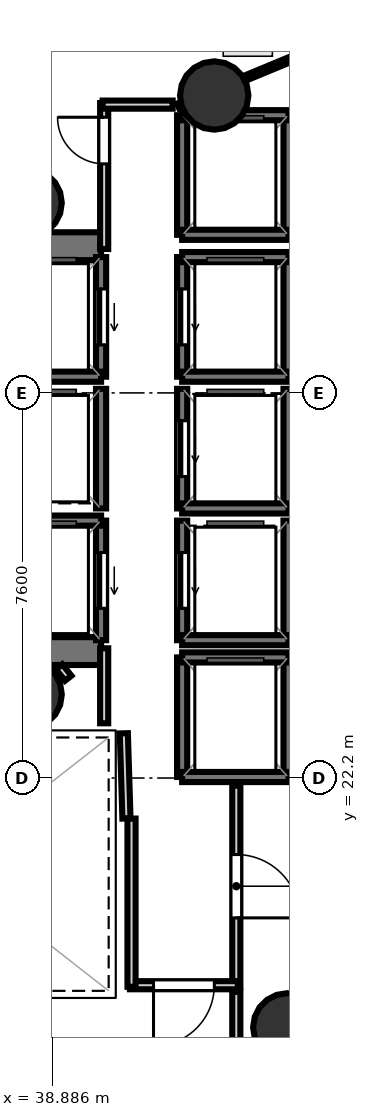
"""IFC4 building model, lengths in metres.
Left out: names, types, materials, properties, quantities, classifications, styles, units other than length and angle.
Written with IfcOpenShell. Run it as: python <this file> out.ifc"""

import sys

from ifc_helpers import new_model, si_unit, direction, frame, frame_2d, origin, origin_2d, place, context, subcontext, project, spatial, rectangle, hollow_circle, extrude, element, fill, save


model = new_model("IFC4")
c1 = context("Model", 3, precision=1e-05, world=origin(), true_north=direction((0.0, 1.0)))
c2 = subcontext(c1, "Body", "Model", "MODEL_VIEW")
j1 = project(units=[si_unit("LENGTHUNIT", "METRE"), si_unit("PLANEANGLEUNIT", "RADIAN")], contexts=[c1])
p1 = place(None, origin())
s1 = spatial("IfcSite", under=j1, at=p1, CompositionType="ELEMENT")
p2 = place(p1, origin())
s2 = spatial("IfcBuilding", under=s1, at=p2, CompositionType="ELEMENT")
p3 = place(p2, frame((0.0, 0.0, 166.1)))
s3 = spatial("IfcBuildingStorey", under=s2, at=p3, CompositionType="ELEMENT", Elevation=166.1)
p4 = place(p3, frame((29.23, 32.695, 0.0), z_axis=(0.0, 0.0, 1.0), x_axis=(1.0, 0.0, 0.0)))
e1 = element("IfcWall", 1, at=p4, inside=s3, PredefinedType="SHEAR", context=c2, shape_type="SweptSolid", body=[
    extrude(rectangle(XDim=10.62, YDim=0.55, at=frame_2d((5.31, 0.0))), origin(), (0.0, 0.0, 1.0), 3.52),
])
p5 = place(p4, frame((0.995, 0.0, 0.0)))
e2 = element("IfcOpeningElement", 2, at=p5, cuts=e1, PredefinedType="OPENING", context=c2, shape_type="SweptSolid", body=[
    extrude(rectangle(XDim=1.25, YDim=2.15, at=frame_2d((0.625, 1.075))), frame((0.0, 0.285, 0.0), z_axis=(0.0, -1.0, 0.0), x_axis=(1.0, 0.0, 0.0)), (0.0, 0.0, 1.0), 0.57),
])
p6 = place(p3, frame((29.23, 24.705, 0.0), z_axis=(0.0, 0.0, 1.0), x_axis=(1.0, 0.0, 0.0)))
e3 = element("IfcWall", 3, at=p6, inside=s3, PredefinedType="SHEAR", context=c2, shape_type="SweptSolid", body=[
    extrude(rectangle(XDim=10.62, YDim=0.55, at=frame_2d((5.31, 0.0))), origin(), (0.0, 0.0, 1.0), 3.52),
])
p7 = place(p6, frame((0.795, 0.0, 0.0)))
e4 = element("IfcOpeningElement", 4, at=p7, cuts=e3, PredefinedType="OPENING", context=c2, shape_type="SweptSolid", body=[
    extrude(rectangle(XDim=1.25, YDim=2.15, at=frame_2d((0.625, 1.075))), frame((0.0, 0.285, 0.0), z_axis=(0.0, -1.0, 0.0), x_axis=(1.0, 0.0, 0.0)), (0.0, 0.0, 1.0), 0.57),
])
for number, where, z_axis, x_axis in (
    (5, (38.4, 33.55, 0.0), (0.0, 0.0, 1.0), (1.0, 0.0, 0.0)),
    (6, (38.4, 23.85, 0.0), (0.0, 0.0, 1.0), (1.0, 0.0, 0.0)),
    (7, (42.083, 35.669, 0.0), (0.0, 0.0, 1.0), (1.0, 0.0, 0.0)),
    (8, (43.525, 17.279, 0.0), (0.0, 0.0, 1.0), (1.0, 0.0, 0.0)),
):
    element("IfcColumn", number, at=place(p3, frame(where, z_axis=z_axis, x_axis=x_axis)), inside=s3, PredefinedType="COLUMN", context=c2, shape_type="SweptSolid", body=[
        extrude(hollow_circle(Radius=0.675, WallThickness=0.032, at=origin_2d()), origin(), (0.0, 0.0, 1.0), 3.7),
    ])
p8 = place(p3, frame((39.85, 30.12, 0.0), z_axis=(0.0, 0.0, 1.0), x_axis=(0.0, 1.0, 0.0)))
e9 = element("IfcWall", 9, at=p8, inside=s3, PredefinedType="SOLIDWALL", context=c2, shape_type="SweptSolid", body=[
    extrude(rectangle(XDim=2.36, YDim=0.2, at=frame_2d((1.18, 0.0))), origin(), (0.0, 0.0, 1.0), 3.52),
])
p9 = place(p8, frame((0.63, 0.0, 0.0)))
e10 = element("IfcOpeningElement", 10, at=p9, cuts=e9, PredefinedType="OPENING", context=c2, shape_type="SweptSolid", body=[
    extrude(rectangle(XDim=1.1, YDim=2.15, at=frame_2d((0.55, 1.075))), frame((0.0, 0.11, 0.0), z_axis=(0.0, -1.0, 0.0), x_axis=(1.0, 0.0, 0.0)), (0.0, 0.0, 1.0), 0.22),
])
p10 = place(p3, frame((37.75, 30.12, 0.0), z_axis=(0.0, 0.0, 1.0), x_axis=(1.0, 0.0, 0.0)))
e11 = element("IfcWall", 11, at=p10, inside=s3, PredefinedType="SOLIDWALL", context=c2, shape_type="SweptSolid", body=[
    extrude(rectangle(XDim=2.1, YDim=0.2, at=frame_2d((1.05, 0.0))), origin(), (0.0, 0.0, 1.0), 3.52),
])
p11 = place(p3, frame((39.85, 24.92, 0.0), z_axis=(0.0, 0.0, 1.0), x_axis=(0.0, 1.0, 0.0)))
e12 = element("IfcWall", 12, at=p11, inside=s3, PredefinedType="SOLIDWALL", context=c2, shape_type="SweptSolid", body=[
    extrude(rectangle(XDim=2.36, YDim=0.2, at=frame_2d((1.18, 0.0))), origin(), (0.0, 0.0, 1.0), 3.52),
])
p12 = place(p11, frame((0.63, 0.0, 0.0)))
e13 = element("IfcOpeningElement", 13, at=p12, cuts=e12, PredefinedType="OPENING", context=c2, shape_type="SweptSolid", body=[
    extrude(rectangle(XDim=1.1, YDim=2.15, at=frame_2d((0.55, 1.075))), frame((0.0, 0.11, 0.0), z_axis=(0.0, -1.0, 0.0), x_axis=(1.0, 0.0, 0.0)), (0.0, 0.0, 1.0), 0.22),
])
p13 = place(p3, frame((37.75, 27.28, 0.0), z_axis=(0.0, 0.0, 1.0), x_axis=(1.0, 0.0, 0.0)))
e14 = element("IfcWall", 14, at=p13, inside=s3, PredefinedType="SOLIDWALL", context=c2, shape_type="SweptSolid", body=[
    extrude(rectangle(XDim=2.1, YDim=0.2, at=frame_2d((1.05, 0.0))), origin(), (0.0, 0.0, 1.0), 3.52),
])
p14 = place(p3, frame((43.55, 30.12, 0.0), z_axis=(0.0, 0.0, 1.0), x_axis=(0.0, 1.0, 0.0)))
e15 = element("IfcWall", 15, at=p14, inside=s3, PredefinedType="SOLIDWALL", context=c2, shape_type="SweptSolid", body=[
    extrude(rectangle(XDim=2.36, YDim=0.2, at=frame_2d((1.18, 0.0))), origin(), (0.0, 0.0, 1.0), 3.52),
])
p15 = place(p3, frame((41.45, 30.12, 0.0), z_axis=(0.0, 0.0, 1.0), x_axis=(0.0, 1.0, 0.0)))
e16 = element("IfcWall", 16, at=p15, inside=s3, PredefinedType="SOLIDWALL", context=c2, shape_type="SweptSolid", body=[
    extrude(rectangle(XDim=2.36, YDim=0.2, at=frame_2d((1.18, 0.0))), origin(), (0.0, 0.0, 1.0), 3.52),
])
p16 = place(p15, frame((0.63, 0.0, 0.0)))
e17 = element("IfcOpeningElement", 17, at=p16, cuts=e16, PredefinedType="OPENING", context=c2, shape_type="SweptSolid", body=[
    extrude(rectangle(XDim=1.1, YDim=2.15, at=frame_2d((0.55, 1.075))), frame((0.0, 0.11, 0.0), z_axis=(0.0, -1.0, 0.0), x_axis=(1.0, 0.0, 0.0)), (0.0, 0.0, 1.0), 0.22),
])
for number, where, z_axis, x_axis in (
    (18, (41.45, 32.48, 0.0), (0.0, 0.0, 1.0), (1.0, 0.0, 0.0)),
    (19, (41.45, 30.12, 0.0), (0.0, 0.0, 1.0), (1.0, 0.0, 0.0)),
):
    element("IfcWall", number, at=place(p3, frame(where, z_axis=z_axis, x_axis=x_axis)), inside=s3, PredefinedType="SOLIDWALL", context=c2, shape_type="SweptSolid", body=[
        extrude(rectangle(XDim=2.1, YDim=0.2, at=frame_2d((1.05, 0.0))), origin(), (0.0, 0.0, 1.0), 3.52),
    ])
p17 = place(p3, frame((43.55, 27.52, 0.0), z_axis=(0.0, 0.0, 1.0), x_axis=(0.0, 1.0, 0.0)))
e20 = element("IfcWall", 20, at=p17, inside=s3, PredefinedType="SOLIDWALL", context=c2, shape_type="SweptSolid", body=[
    extrude(rectangle(XDim=2.36, YDim=0.2, at=frame_2d((1.18, 0.0))), origin(), (0.0, 0.0, 1.0), 3.52),
])
p18 = place(p3, frame((41.45, 27.52, 0.0), z_axis=(0.0, 0.0, 1.0), x_axis=(0.0, 1.0, 0.0)))
e21 = element("IfcWall", 21, at=p18, inside=s3, PredefinedType="SOLIDWALL", context=c2, shape_type="SweptSolid", body=[
    extrude(rectangle(XDim=2.36, YDim=0.2, at=frame_2d((1.18, 0.0))), origin(), (0.0, 0.0, 1.0), 3.52),
])
p19 = place(p18, frame((0.63, 0.0, 0.0)))
e22 = element("IfcOpeningElement", 22, at=p19, cuts=e21, PredefinedType="OPENING", context=c2, shape_type="SweptSolid", body=[
    extrude(rectangle(XDim=1.1, YDim=2.15, at=frame_2d((0.55, 1.075))), frame((0.0, 0.11, 0.0), z_axis=(0.0, -1.0, 0.0), x_axis=(1.0, 0.0, 0.0)), (0.0, 0.0, 1.0), 0.22),
])
p20 = place(p3, frame((41.45, 27.52, 0.0), z_axis=(0.0, 0.0, 1.0), x_axis=(1.0, 0.0, 0.0)))
e23 = element("IfcWall", 23, at=p20, inside=s3, PredefinedType="SOLIDWALL", context=c2, shape_type="SweptSolid", body=[
    extrude(rectangle(XDim=2.1, YDim=0.2, at=frame_2d((1.05, 0.0))), origin(), (0.0, 0.0, 1.0), 3.52),
])
p21 = place(p3, frame((43.55, 24.92, 0.0), z_axis=(0.0, 0.0, 1.0), x_axis=(0.0, 1.0, 0.0)))
e24 = element("IfcWall", 24, at=p21, inside=s3, PredefinedType="SOLIDWALL", context=c2, shape_type="SweptSolid", body=[
    extrude(rectangle(XDim=2.36, YDim=0.2, at=frame_2d((1.18, 0.0))), origin(), (0.0, 0.0, 1.0), 3.52),
])
p22 = place(p3, frame((41.45, 24.92, 0.0), z_axis=(0.0, 0.0, 1.0), x_axis=(0.0, 1.0, 0.0)))
e25 = element("IfcWall", 25, at=p22, inside=s3, PredefinedType="SOLIDWALL", context=c2, shape_type="SweptSolid", body=[
    extrude(rectangle(XDim=2.36, YDim=0.2, at=frame_2d((1.18, 0.0))), origin(), (0.0, 0.0, 1.0), 3.52),
])
p23 = place(p22, frame((0.63, 0.0, 0.0)))
e26 = element("IfcOpeningElement", 26, at=p23, cuts=e25, PredefinedType="OPENING", context=c2, shape_type="SweptSolid", body=[
    extrude(rectangle(XDim=1.1, YDim=2.15, at=frame_2d((0.55, 1.075))), frame((0.0, 0.11, 0.0), z_axis=(0.0, -1.0, 0.0), x_axis=(1.0, 0.0, 0.0)), (0.0, 0.0, 1.0), 0.22),
])
p24 = place(p3, frame((41.45, 24.92, 0.0), z_axis=(0.0, 0.0, 1.0), x_axis=(1.0, 0.0, 0.0)))
e27 = element("IfcWall", 27, at=p24, inside=s3, PredefinedType="SOLIDWALL", context=c2, shape_type="SweptSolid", body=[
    extrude(rectangle(XDim=2.1, YDim=0.2, at=frame_2d((1.05, 0.0))), origin(), (0.0, 0.0, 1.0), 3.52),
])
p25 = place(p3, frame((39.85, 27.52, 0.0), z_axis=(0.0, 0.0, 1.0), x_axis=(0.0, 1.0, 0.0)))
e28 = element("IfcWall", 28, at=p25, inside=s3, PredefinedType="SOLIDWALL", context=c2, shape_type="SweptSolid", body=[
    extrude(rectangle(XDim=2.36, YDim=0.2, at=frame_2d((1.18, 0.0))), origin(), (0.0, 0.0, 1.0), 3.52),
])
for number, where, z_axis, x_axis in (
    (29, (43.55, 22.22, 0.0), (0.0, 0.0, 1.0), (0.0, 1.0, 0.0)),
    (30, (41.45, 22.22, 0.0), (0.0, 0.0, 1.0), (0.0, 1.0, 0.0)),
):
    element("IfcWall", number, at=place(p3, frame(where, z_axis=z_axis, x_axis=x_axis)), inside=s3, PredefinedType="SOLIDWALL", context=c2, shape_type="SweptSolid", body=[
        extrude(rectangle(XDim=2.36, YDim=0.2, at=frame_2d((1.18, 0.0))), origin(), (0.0, 0.0, 1.0), 3.52),
    ])
for number, where, z_axis, x_axis in (
    (31, (41.45, 24.58, 0.0), (0.0, 0.0, 1.0), (1.0, 0.0, 0.0)),
    (32, (41.45, 22.22, 0.0), (0.0, 0.0, 1.0), (1.0, 0.0, 0.0)),
):
    element("IfcWall", number, at=place(p3, frame(where, z_axis=z_axis, x_axis=x_axis)), inside=s3, PredefinedType="SOLIDWALL", context=c2, shape_type="SweptSolid", body=[
        extrude(rectangle(XDim=2.1, YDim=0.2, at=frame_2d((1.05, 0.0))), origin(), (0.0, 0.0, 1.0), 3.52),
    ])
for number, where, z_axis, x_axis in (
    (33, (43.55, 32.92, 0.0), (0.0, 0.0, 1.0), (0.0, 1.0, 0.0)),
    (34, (41.45, 32.92, 0.0), (0.0, 0.0, 1.0), (0.0, 1.0, 0.0)),
):
    element("IfcWall", number, at=place(p3, frame(where, z_axis=z_axis, x_axis=x_axis)), inside=s3, PredefinedType="SOLIDWALL", context=c2, shape_type="SweptSolid", body=[
        extrude(rectangle(XDim=2.36, YDim=0.2, at=frame_2d((1.18, 0.0))), origin(), (0.0, 0.0, 1.0), 3.52),
    ])
for number, where, z_axis, x_axis in (
    (35, (41.45, 35.28, 0.0), (0.0, 0.0, 1.0), (1.0, 0.0, 0.0)),
    (36, (41.45, 32.92, 0.0), (0.0, 0.0, 1.0), (1.0, 0.0, 0.0)),
):
    element("IfcWall", number, at=place(p3, frame(where, z_axis=z_axis, x_axis=x_axis)), inside=s3, PredefinedType="SOLIDWALL", context=c2, shape_type="SweptSolid", body=[
        extrude(rectangle(XDim=2.1, YDim=0.2, at=frame_2d((1.05, 0.0))), origin(), (0.0, 0.0, 1.0), 3.52),
    ])
p26 = place(p3, frame((40.351, 21.401, 0.0), z_axis=(0.0, 0.0, 1.0), x_axis=(-0.031058045979, 0.999517582527, 0.0)))
e37 = element("IfcWall", 37, at=p26, inside=s3, PredefinedType="PARTITIONING", context=c2, shape_type="SweptSolid", body=[
    extrude(rectangle(XDim=1.682, YDim=0.16, at=frame_2d((0.841, 0.0))), origin(), (0.0, 0.0, 1.0), 2.84),
])
p27 = place(p3, frame((39.911, 23.28, 0.0), z_axis=(0.0, 0.0, 1.0), x_axis=(0.0, 1.0, 0.0)))
e38 = element("IfcWall", 38, at=p27, inside=s3, PredefinedType="PARTITIONING", context=c2, shape_type="SweptSolid", body=[
    extrude(rectangle(XDim=1.48, YDim=0.16, at=frame_2d((0.74, 0.0))), origin(), (0.0, 0.0, 1.0), 2.84),
])
p28 = place(p3, frame((39.911, 32.64, 0.0), z_axis=(0.0, 0.0, 1.0), x_axis=(0.0, 1.0, 0.0)))
e39 = element("IfcWall", 39, at=p28, inside=s3, PredefinedType="PARTITIONING", context=c2, shape_type="SweptSolid", body=[
    extrude(rectangle(XDim=2.88, YDim=0.16, at=frame_2d((1.44, 0.0))), origin(), (0.0, 0.0, 1.0), 2.84),
])
p29 = place(p28, frame((1.68, 0.0, 0.0)))
e40 = element("IfcOpeningElement", 40, at=p29, cuts=e39, PredefinedType="OPENING", context=c2, shape_type="SweptSolid", body=[
    extrude(rectangle(XDim=0.92, YDim=2.1, at=frame_2d((0.46, 1.05))), frame((0.0, 0.09, 0.0), z_axis=(0.0, -1.0, 0.0), x_axis=(1.0, 0.0, 0.0)), (0.0, 0.0, 1.0), 0.18),
])
p30 = place(p3, frame((39.88, 35.489, 0.0), z_axis=(0.0, 0.0, 1.0), x_axis=(1.0, 0.0, 0.0)))
e41 = element("IfcWall", 41, at=p30, inside=s3, PredefinedType="PARTITIONING", context=c2, shape_type="SweptSolid", body=[
    extrude(rectangle(XDim=1.383, YDim=0.16, at=frame_2d((0.691, 0.0))), origin(), (0.0, 0.0, 1.0), 2.84),
])
p31 = place(p3, frame((42.519, 22.05, 0.0), z_axis=(0.0, 0.0, 1.0), x_axis=(0.0, -1.0, 0.0)))
e42 = element("IfcWall", 42, at=p31, inside=s3, PredefinedType="PARTITIONING", context=c2, shape_type="SweptSolid", body=[
    extrude(rectangle(XDim=3.97, YDim=0.16, at=frame_2d((1.985, 0.0))), origin(), (0.0, 0.0, 1.0), 2.84),
])
p32 = place(p31, frame((1.36, 0.0, 0.0)))
e43 = element("IfcOpeningElement", 43, at=p32, cuts=e42, PredefinedType="OPENING", context=c2, shape_type="SweptSolid", body=[
    extrude(rectangle(XDim=1.25, YDim=2.2, at=frame_2d((0.625, 1.1))), frame((0.0, 0.09, 0.0), z_axis=(0.0, -1.0, 0.0), x_axis=(1.0, 0.0, 0.0)), (0.0, 0.0, 1.0), 0.18),
])
p33 = place(p3, frame((42.55, 18.111, 0.0), z_axis=(0.0, 0.0, 1.0), x_axis=(-1.0, 0.0, 0.0)))
e44 = element("IfcWall", 44, at=p33, inside=s3, PredefinedType="PARTITIONING", context=c2, shape_type="SweptSolid", body=[
    extrude(rectangle(XDim=2.13, YDim=0.16, at=frame_2d((1.065, 0.0))), origin(), (0.0, 0.0, 1.0), 2.84),
])
p34 = place(p33, frame((0.465, 0.0, 0.0)))
e45 = element("IfcOpeningElement", 45, at=p34, cuts=e44, PredefinedType="OPENING", context=c2, shape_type="SweptSolid", body=[
    extrude(rectangle(XDim=1.2, YDim=2.15, at=frame_2d((0.6, 1.075))), frame((0.0, 0.09, 0.0), z_axis=(0.0, -1.0, 0.0), x_axis=(1.0, 0.0, 0.0)), (0.0, 0.0, 1.0), 0.18),
])
p35 = place(p3, frame((40.451, 18.08, 0.0), z_axis=(0.0, 0.0, 1.0), x_axis=(0.0, 1.0, 0.0)))
e46 = element("IfcWall", 46, at=p35, inside=s3, PredefinedType="PARTITIONING", context=c2, shape_type="SweptSolid", body=[
    extrude(rectangle(XDim=3.32, YDim=0.16, at=frame_2d((1.66, 0.0))), origin(), (0.0, 0.0, 1.0), 2.84),
])
p36 = place(p3, frame((39.202, 24.169, 0.0), z_axis=(0.0, 0.0, 1.0), x_axis=(-0.621699046284, 0.783256213413, 0.0)))
e47 = element("IfcWall", 47, at=p36, inside=s3, PredefinedType="PARTITIONING", context=c2, shape_type="SweptSolid", body=[
    extrude(rectangle(XDim=0.289, YDim=0.16, at=frame_2d((0.144, 0.0))), origin(), (0.0, 0.0, 1.0), 2.84),
])
p37 = place(p3, frame((42.519, 17.98, 0.0), z_axis=(0.0, 0.0, 1.0), x_axis=(0.0, -1.0, 0.0)))
e48 = element("IfcWall", 48, at=p37, inside=s3, PredefinedType="PARTITIONING", context=c2, shape_type="SweptSolid", body=[
    extrude(rectangle(XDim=3.095, YDim=0.16, at=frame_2d((1.548, 0.0))), origin(), (0.0, 0.0, 1.0), 2.84),
])
p38 = place(p3, frame((44.013, 36.56, 0.0), z_axis=(0.0, 0.0, 1.0), x_axis=(-0.92343251963, -0.383760839181, 0.0)))
e49 = element("IfcWall", 49, at=p38, inside=s3, PredefinedType="PARTITIONING", context=c2, shape_type="SweptSolid", body=[
    extrude(rectangle(XDim=2.861, YDim=0.105, at=frame_2d((1.43, 0.0))), origin(), (0.0, 0.0, 1.0), 2.84),
])
p39 = place(p9, origin())
e50 = element("IfcDoor", 50, at=p39, inside=s3, OperationType="SLIDING_TO_LEFT", PredefinedType="DOOR", context=c2, shape_type="SweptSolid", body=[
    extrude(rectangle(XDim=1.1, YDim=2.15, at=frame_2d((0.55, 1.075))), frame((0.0, 0.025, 0.0), z_axis=(0.0, -1.0, 0.0), x_axis=(1.0, 0.0, 0.0)), (0.0, 0.0, 1.0), 0.05),
])
fill(e10, e50)
p40 = place(p12, origin())
e51 = element("IfcDoor", 51, at=p40, inside=s3, OperationType="SLIDING_TO_LEFT", PredefinedType="DOOR", context=c2, shape_type="SweptSolid", body=[
    extrude(rectangle(XDim=1.1, YDim=2.15, at=frame_2d((0.55, 1.075))), frame((0.0, 0.025, 0.0), z_axis=(0.0, -1.0, 0.0), x_axis=(1.0, 0.0, 0.0)), (0.0, 0.0, 1.0), 0.05),
])
fill(e13, e51)
p41 = place(p16, origin())
e52 = element("IfcDoor", 52, at=p41, inside=s3, OperationType="SLIDING_TO_LEFT", PredefinedType="DOOR", context=c2, shape_type="SweptSolid", body=[
    extrude(rectangle(XDim=1.1, YDim=2.15, at=frame_2d((0.55, 1.075))), frame((0.0, 0.025, 0.0), z_axis=(0.0, -1.0, 0.0), x_axis=(1.0, 0.0, 0.0)), (0.0, 0.0, 1.0), 0.05),
])
fill(e17, e52)
p42 = place(p19, origin())
e53 = element("IfcDoor", 53, at=p42, inside=s3, OperationType="SLIDING_TO_LEFT", PredefinedType="DOOR", context=c2, shape_type="SweptSolid", body=[
    extrude(rectangle(XDim=1.1, YDim=2.15, at=frame_2d((0.55, 1.075))), frame((0.0, 0.025, 0.0), z_axis=(0.0, -1.0, 0.0), x_axis=(1.0, 0.0, 0.0)), (0.0, 0.0, 1.0), 0.05),
])
fill(e22, e53)
p43 = place(p23, origin())
e54 = element("IfcDoor", 54, at=p43, inside=s3, OperationType="SLIDING_TO_LEFT", PredefinedType="DOOR", context=c2, shape_type="SweptSolid", body=[
    extrude(rectangle(XDim=1.1, YDim=2.15, at=frame_2d((0.55, 1.075))), frame((0.0, 0.025, 0.0), z_axis=(0.0, -1.0, 0.0), x_axis=(1.0, 0.0, 0.0)), (0.0, 0.0, 1.0), 0.05),
])
fill(e26, e54)
p44 = place(p34, origin())
e55 = element("IfcDoor", 55, at=p44, inside=s3, OperationType="SINGLE_SWING_RIGHT", PredefinedType="DOOR", context=c2, shape_type="SweptSolid", body=[
    extrude(rectangle(XDim=1.2, YDim=2.15, at=frame_2d((0.6, 1.075))), frame((0.0, 0.025, 0.0), z_axis=(0.0, -1.0, 0.0), x_axis=(1.0, 0.0, 0.0)), (0.0, 0.0, 1.0), 0.05),
])
fill(e45, e55)
p45 = place(p32, origin())
e56 = element("IfcDoor", 56, at=p45, inside=s3, OperationType="SINGLE_SWING_RIGHT", PredefinedType="DOOR", context=c2, shape_type="SweptSolid", body=[
    extrude(rectangle(XDim=1.25, YDim=2.2, at=frame_2d((0.625, 1.1))), frame((0.0, 0.025, 0.0), z_axis=(0.0, -1.0, 0.0), x_axis=(1.0, 0.0, 0.0)), (0.0, 0.0, 1.0), 0.05),
])
fill(e43, e56)
p46 = place(p29, origin())
e57 = element("IfcDoor", 57, at=p46, inside=s3, OperationType="SINGLE_SWING_RIGHT", PredefinedType="DOOR", context=c2, shape_type="SweptSolid", body=[
    extrude(rectangle(XDim=0.92, YDim=2.1, at=frame_2d((0.46, 1.05))), frame((0.0, 0.025, 0.0), z_axis=(0.0, -1.0, 0.0), x_axis=(1.0, 0.0, 0.0)), (0.0, 0.0, 1.0), 0.05),
])
fill(e40, e57)
save(model, sys.argv[1])
